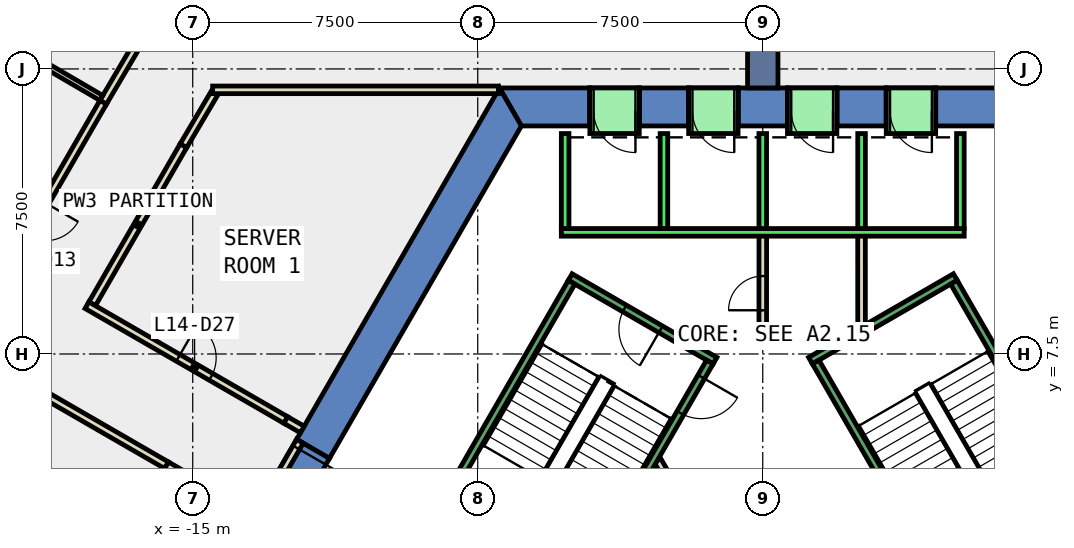
"""IFC4 building model, lengths in metres.
Left out: names, types, materials, properties, quantities, classifications, styles, units other than length and angle.
Written with IfcOpenShell. Run it as: python <this file> out.ifc"""

import sys

from ifc_helpers import new_model, si_unit, direction, frame, frame_2d, origin, place, context, subcontext, project, spatial, polyline, rectangle, outline, extrude, element, fill, save


model = new_model("IFC4")
c1 = context("Model", 3, precision=1e-05, world=origin(), true_north=direction((0.0, 1.0)))
c2 = subcontext(c1, "Body", "Model", "MODEL_VIEW")
j1 = project(units=[si_unit("LENGTHUNIT", "METRE"), si_unit("PLANEANGLEUNIT", "RADIAN")], contexts=[c1])
p1 = place(None, origin())
s1 = spatial("IfcSite", under=j1, at=p1, CompositionType="ELEMENT")
p2 = place(p1, origin())
s2 = spatial("IfcBuilding", under=s1, at=p2, CompositionType="ELEMENT")
p3 = place(p2, frame((0.0, 0.0, 68.6)))
s3 = spatial("IfcBuildingStorey", under=s2, at=p3, CompositionType="ELEMENT", Elevation=68.6)
p4 = place(p3, frame((0.0, 0.0, -0.4)))
e1 = element("IfcWall", 1, at=p4, inside=s3, PredefinedType="SHEAR", context=c2, shape_type="SweptSolid", body=[
    extrude(outline(polyline([(4.55, 14.5), (4.55, 13.5), (6.351, 13.5), (6.928, 14.5), (4.55, 14.5)])), origin(), (0.0, 0.0, 1.0), 4.2),
])
p5 = place(p3, frame((0.0, 0.0, -0.4)))
e2 = element("IfcWall", 2, at=p5, inside=s3, PredefinedType="SHEAR", context=c2, shape_type="SweptSolid", body=[
    extrude(outline(polyline([(1.95, 14.5), (1.95, 13.5), (3.25, 13.5), (3.25, 14.5), (1.95, 14.5)])), origin(), (0.0, 0.0, 1.0), 4.2),
])
p6 = place(p3, frame((0.0, 0.0, -0.4)))
e3 = element("IfcWall", 3, at=p6, inside=s3, PredefinedType="SHEAR", context=c2, shape_type="SweptSolid", body=[
    extrude(outline(polyline([(-0.65, 14.5), (-0.65, 13.5), (0.65, 13.5), (0.65, 14.5), (-0.65, 14.5)])), origin(), (0.0, 0.0, 1.0), 4.2),
])
p7 = place(p3, frame((0.0, 0.0, -0.4)))
e4 = element("IfcWall", 4, at=p7, inside=s3, PredefinedType="SHEAR", context=c2, shape_type="SweptSolid", body=[
    extrude(outline(polyline([(-3.25, 14.5), (-3.25, 13.5), (-1.95, 13.5), (-1.95, 14.5), (-3.25, 14.5)])), origin(), (0.0, 0.0, 1.0), 4.2),
])
p8 = place(p3, frame((0.0, 0.0, -0.4)))
e5 = element("IfcWall", 5, at=p8, inside=s3, PredefinedType="SHEAR", context=c2, shape_type="SweptSolid", body=[
    extrude(outline(polyline([(-4.55, 13.5), (-4.55, 14.5), (-6.928, 14.5), (-6.351, 13.5), (-4.55, 13.5)])), origin(), (0.0, 0.0, 1.0), 4.2),
])
p9 = place(p3, frame((0.0, 0.0, 3.6)))
e6 = element("IfcWall", 6, at=p9, inside=s3, PredefinedType="SHEAR", context=c2, shape_type="SweptSolid", body=[
    extrude(outline(polyline([(3.25, 14.5), (3.25, 13.5), (4.55, 13.5), (4.55, 14.5), (3.25, 14.5)])), origin(), (0.0, 0.0, 1.0), 0.2),
])
p10 = place(p3, frame((0.0, 0.0, 3.6)))
e7 = element("IfcWall", 7, at=p10, inside=s3, PredefinedType="SHEAR", context=c2, shape_type="SweptSolid", body=[
    extrude(outline(polyline([(0.65, 14.5), (0.65, 13.5), (1.95, 13.5), (1.95, 14.5), (0.65, 14.5)])), origin(), (0.0, 0.0, 1.0), 0.2),
])
p11 = place(p3, frame((0.0, 0.0, 3.6)))
e8 = element("IfcWall", 8, at=p11, inside=s3, PredefinedType="SHEAR", context=c2, shape_type="SweptSolid", body=[
    extrude(outline(polyline([(-1.95, 14.5), (-1.95, 13.5), (-0.65, 13.5), (-0.65, 14.5), (-1.95, 14.5)])), origin(), (0.0, 0.0, 1.0), 0.2),
])
p12 = place(p3, frame((0.0, 0.0, 3.6)))
e9 = element("IfcWall", 9, at=p12, inside=s3, PredefinedType="SHEAR", context=c2, shape_type="SweptSolid", body=[
    extrude(outline(polyline([(-4.55, 14.5), (-4.55, 13.5), (-3.25, 13.5), (-3.25, 14.5), (-4.55, 14.5)])), origin(), (0.0, 0.0, 1.0), 0.2),
])
p13 = place(p3, frame((0.0, 0.0, -0.4)))
e10 = element("IfcWall", 10, at=p13, inside=s3, PredefinedType="SHEAR", context=c2, shape_type="SweptSolid", body=[
    extrude(outline(polyline([(-12.267, 5.252), (-11.402, 4.752), (-6.351, 13.5), (-6.928, 14.5), (-12.267, 5.252)])), origin(), (0.0, 0.0, 1.0), 4.2),
])
p14 = place(p3, frame((0.0, 0.0, 3.6)))
e11 = element("IfcWall", 11, at=p14, inside=s3, PredefinedType="SHEAR", context=c2, shape_type="SweptSolid", body=[
    extrude(outline(polyline([(-13.267, 3.52), (-12.402, 3.02), (-11.402, 4.752), (-12.267, 5.252), (-13.267, 3.52)])), origin(), (0.0, 0.0, 1.0), 0.2),
])
p15 = place(p3, frame((0.0, 14.5, -0.4), z_axis=(0.0, 0.0, 1.0), x_axis=(0.0, 1.0, 0.0)))
e12 = element("IfcWall", 12, at=p15, inside=s3, PredefinedType="SHEAR", context=c2, shape_type="SweptSolid", body=[
    extrude(rectangle(XDim=9.0, YDim=0.8, at=frame_2d((4.5, 0.0))), origin(), (0.0, 0.0, 1.0), 4.2),
])
p16 = place(p3, frame((-14.427, 14.364, 0.0), z_axis=(0.0, 0.0, 1.0), x_axis=(-0.508509719672, -0.861056249614, 0.0)))
e13 = element("IfcWall", 13, at=p16, inside=s3, PredefinedType="PARTITIONING", context=c2, shape_type="SweptSolid", body=[
    extrude(rectangle(XDim=1.611, YDim=0.2, at=frame_2d((0.805, 0.0))), origin(), (0.0, 0.0, 1.0), 3.8),
])
p17 = place(p3, frame((-15.246, 12.977, 0.0), z_axis=(0.0, 0.0, 1.0), x_axis=(-0.499891203561, -0.866088208327, 0.0)))
e14 = element("IfcWall", 14, at=p17, inside=s3, PredefinedType="PARTITIONING", context=c2, shape_type="SweptSolid", body=[
    extrude(rectangle(XDim=4.801, YDim=0.2, at=frame_2d((2.4, 0.0))), origin(), (0.0, 0.0, 1.0), 3.8),
])
p18 = place(p3, frame((-17.783, 8.783, 0.0), z_axis=(0.0, 0.0, 1.0), x_axis=(0.866041598752, -0.499971948444, 0.0)))
e15 = element("IfcWall", 15, at=p18, inside=s3, PredefinedType="PARTITIONING", context=c2, shape_type="SweptSolid", body=[
    extrude(rectangle(XDim=6.042, YDim=0.2, at=frame_2d((3.021, 0.0))), origin(), (0.0, 0.0, 1.0), 3.8),
])
p19 = place(p18, frame((2.771, 0.0, 0.0)))
e16 = element("IfcOpeningElement", 16, at=p19, cuts=e15, PredefinedType="OPENING", context=c2, shape_type="SweptSolid", body=[
    extrude(rectangle(XDim=1.0, YDim=2.1, at=frame_2d((0.5, 1.05))), frame((0.0, 0.11, 0.0), z_axis=(0.0, -1.0, 0.0), x_axis=(1.0, 0.0, 0.0)), (0.0, 0.0, 1.0), 0.22),
])
p20 = place(p3, frame((-15.687, 4.571, 0.0), z_axis=(0.0, 0.0, 1.0), x_axis=(-0.866044530317, 0.49996687041, 0.0)))
e17 = element("IfcWall", 17, at=p20, inside=s3, PredefinedType="PARTITIONING", context=c2, shape_type="SweptSolid", body=[
    extrude(rectangle(XDim=3.718, YDim=0.2, at=frame_2d((1.859, 0.0))), origin(), (0.0, 0.0, 1.0), 3.8),
])
p21 = place(p3, frame((-17.357, 14.122, 0.0), z_axis=(0.0, 0.0, 1.0), x_axis=(0.508298575594, 0.861180909014, 0.0)))
e18 = element("IfcWall", 18, at=p21, inside=s3, PredefinedType="PARTITIONING", context=c2, shape_type="SweptSolid", body=[
    extrude(rectangle(XDim=7.258, YDim=0.2, at=frame_2d((3.629, 0.0))), origin(), (0.0, 0.0, 1.0), 3.8),
])
p22 = place(p21, frame((3.204, 0.0, 0.0)))
e19 = element("IfcOpeningElement", 19, at=p22, cuts=e18, PredefinedType="OPENING", context=c2, shape_type="SweptSolid", body=[
    extrude(rectangle(XDim=1.0, YDim=2.1, at=frame_2d((0.5, 1.05))), frame((0.0, 0.11, 0.0), z_axis=(0.0, -1.0, 0.0), x_axis=(1.0, 0.0, 0.0)), (0.0, 0.0, 1.0), 0.22),
])
p23 = place(p3, frame((-17.356, 14.122, 0.0), z_axis=(0.0, 0.0, 1.0), x_axis=(-0.499946764175, -0.866056137321, 0.0)))
e20 = element("IfcWall", 20, at=p23, inside=s3, PredefinedType="PARTITIONING", context=c2, shape_type="SweptSolid", body=[
    extrude(rectangle(XDim=7.255, YDim=0.2, at=frame_2d((3.627, 0.0))), origin(), (0.0, 0.0, 1.0), 3.8),
])
p24 = place(p23, frame((3.052, 0.0, 0.0)))
e21 = element("IfcOpeningElement", 21, at=p24, cuts=e20, PredefinedType="OPENING", context=c2, shape_type="SweptSolid", body=[
    extrude(rectangle(XDim=1.0, YDim=2.1, at=frame_2d((0.5, 1.05))), frame((0.0, 0.11, 0.0), z_axis=(0.0, -1.0, 0.0), x_axis=(1.0, 0.0, 0.0)), (0.0, 0.0, 1.0), 0.22),
])
p25 = place(p3, frame((1.88, 7.8, 0.0), z_axis=(0.0, 0.0, 1.0), x_axis=(-1.0, 0.0, 0.0)))
e22 = element("IfcWall", 22, at=p25, inside=s3, PredefinedType="PARTITIONING", context=c2, shape_type="SweptSolid", body=[
    extrude(rectangle(XDim=1.78, YDim=0.2, at=frame_2d((0.89, 0.0))), origin(), (0.0, 0.0, 1.0), 3.8),
])
p26 = place(p3, frame((0.0, 7.7, 0.0), z_axis=(0.0, 0.0, 1.0), x_axis=(0.000325520816, 0.999999947018, 0.0)))
e23 = element("IfcWall", 23, at=p26, inside=s3, PredefinedType="PARTITIONING", context=c2, shape_type="SweptSolid", body=[
    extrude(rectangle(XDim=3.0, YDim=0.2, at=frame_2d((1.5, 0.0))), origin(), (0.0, 0.0, 1.0), 3.8),
])
p27 = place(p26, frame((0.95, 0.0, 0.0)))
e24 = element("IfcOpeningElement", 24, at=p27, cuts=e23, PredefinedType="OPENING", context=c2, shape_type="SweptSolid", body=[
    extrude(rectangle(XDim=0.9, YDim=2.1, at=frame_2d((0.45, 1.05))), frame((0.0, 0.11, 0.0), z_axis=(0.0, -1.0, 0.0), x_axis=(1.0, 0.0, 0.0)), (0.0, 0.0, 1.0), 0.22),
])
p28 = place(p3, frame((2.599, 10.7, 0.0), z_axis=(0.0, 0.0, 1.0), x_axis=(0.000393159002, -0.999999922713, 0.0)))
e25 = element("IfcWall", 25, at=p28, inside=s3, PredefinedType="PARTITIONING", context=c2, shape_type="SweptSolid", body=[
    extrude(rectangle(XDim=2.484, YDim=0.2, at=frame_2d((1.242, 0.0))), origin(), (0.0, 0.0, 1.0), 3.8),
])
p29 = place(p3, frame((-6.957, 14.45, 0.0), z_axis=(0.0, 0.0, 1.0), x_axis=(-1.0, 0.0, 0.0)))
e26 = element("IfcWall", 26, at=p29, inside=s3, PredefinedType="PARTITIONING", context=c2, shape_type="SweptSolid", body=[
    extrude(rectangle(XDim=7.519, YDim=0.2, at=frame_2d((3.76, 0.0))), origin(), (0.0, 0.0, 1.0), 3.8),
])
p30 = place(p3, frame((-2.771, 4.7, 0.0), z_axis=(0.0, 0.0, 1.0), x_axis=(0.499969479948, -0.866043023828, 0.0)))
e27 = element("IfcWall", 27, at=p30, inside=s3, PredefinedType="PARTITIONING", context=c2, shape_type="SweptSolid", body=[
    extrude(rectangle(XDim=4.99, YDim=0.2, at=frame_2d((2.495, 0.0))), origin(), (0.0, 0.0, 1.0), 3.8),
])
p31 = place(p30, frame((1.945, 0.0, 0.0)))
e28 = element("IfcOpeningElement", 28, at=p31, cuts=e27, PredefinedType="OPENING", context=c2, shape_type="SweptSolid", body=[
    extrude(rectangle(XDim=1.0, YDim=2.1, at=frame_2d((0.5, 1.05))), frame((0.0, 0.11, 0.0), z_axis=(0.0, -1.0, 0.0), x_axis=(1.0, 0.0, 0.0)), (0.0, 0.0, 1.0), 0.22),
])
p32 = place(p3, frame((-15.724, 4.534, 0.0), z_axis=(0.0, 0.0, 1.0), x_axis=(0.500195085719, -0.865912741691, 0.0)))
e29 = element("IfcWall", 29, at=p32, inside=s3, PredefinedType="PARTITIONING", context=c2, shape_type="SweptSolid", body=[
    extrude(rectangle(XDim=1.282, YDim=0.2, at=frame_2d((0.641, 0.0))), origin(), (0.0, 0.0, 1.0), 3.8),
])
p33 = place(p3, frame((-17.405, 14.237, 0.0), z_axis=(0.0, 0.0, 1.0), x_axis=(-0.863614048932, 0.504153522736, 0.0)))
e30 = element("IfcWall", 30, at=p33, inside=s3, PredefinedType="PARTITIONING", context=c2, shape_type="SweptSolid", body=[
    extrude(rectangle(XDim=5.48, YDim=0.15, at=frame_2d((2.74, 0.0))), origin(), (0.0, 0.0, 1.0), 3.8),
])
p34 = place(p3, frame((-12.18, 5.202, 0.0), z_axis=(0.0, 0.0, 1.0), x_axis=(-0.50002537861, -0.866010750942, 0.0)))
e31 = element("IfcWall", 31, at=p34, inside=s3, PredefinedType="PARTITIONING", context=c2, shape_type="SweptSolid", body=[
    extrude(rectangle(XDim=2.0, YDim=0.2, at=frame_2d((1.0, 0.0))), origin(), (0.0, 0.0, 1.0), 2.4),
])
p35 = place(p34, frame((0.19, 0.0, 0.0)))
e32 = element("IfcOpeningElement", 32, at=p35, cuts=e31, PredefinedType="OPENING", context=c2, shape_type="SweptSolid", body=[
    extrude(rectangle(XDim=1.8, YDim=2.1, at=frame_2d((0.9, 1.05))), frame((0.0, 0.11, 0.0), z_axis=(0.0, -1.0, 0.0), x_axis=(1.0, 0.0, 0.0)), (0.0, 0.0, 1.0), 0.22),
])
p36 = place(p3, frame((-12.55, 5.762, 0.0), z_axis=(0.0, 0.0, 1.0), x_axis=(0.866071776036, -0.499919672301, 0.0)))
e33 = element("IfcWall", 33, at=p36, inside=s3, PredefinedType="PARTITIONING", context=c2, shape_type="SweptSolid", body=[
    extrude(rectangle(XDim=0.5, YDim=0.2, at=frame_2d((0.25, 0.0))), origin(), (0.0, 0.0, 1.0), 2.4),
])
p37 = place(p3, frame((-13.85, 3.51, 0.0), z_axis=(0.0, 0.0, 1.0), x_axis=(-0.865924890849, 0.500174053114, 0.0)))
e34 = element("IfcWall", 34, at=p37, inside=s3, PredefinedType="PARTITIONING", context=c2, shape_type="SweptSolid", body=[
    extrude(rectangle(XDim=2.121, YDim=0.2, at=frame_2d((1.061, 0.0))), origin(), (0.0, 0.0, 1.0), 3.8),
])
p38 = place(p3, frame((5.3, 10.7, 0.0), z_axis=(0.0, 0.0, 1.0), x_axis=(-1.0, 0.0, 0.0)))
e35 = element("IfcWall", 35, at=p38, inside=s3, PredefinedType="STANDARD", context=c2, shape_type="SweptSolid", body=[
    extrude(rectangle(XDim=10.6, YDim=0.2, at=frame_2d((5.3, 0.0))), origin(), (0.0, 0.0, 1.0), 3.8),
])
for number, where, z_axis, x_axis in (
    (36, (5.2, 10.8, 0.0), (0.0, 0.0, 1.0), (0.0, 1.0, 0.0)),
    (37, (2.6, 10.8, 0.0), (0.0, 0.0, 1.0), (0.0, 1.0, 0.0)),
    (38, (0.0, 10.8, 0.0), (0.0, 0.0, 1.0), (0.0, 1.0, 0.0)),
    (39, (-2.6, 10.8, 0.0), (0.0, 0.0, 1.0), (0.0, 1.0, 0.0)),
    (40, (-5.2, 10.8, 0.0), (0.0, 0.0, 1.0), (0.0, 1.0, 0.0)),
):
    element("IfcWall", number, at=place(p3, frame(where, z_axis=z_axis, x_axis=x_axis)), inside=s3, PredefinedType="STANDARD", context=c2, shape_type="SweptSolid", body=[
        extrude(rectangle(XDim=2.5, YDim=0.2, at=frame_2d((1.25, 0.0))), origin(), (0.0, 0.0, 1.0), 3.8),
    ])
p39 = place(p3, frame((4.55, 13.9, 0.0), z_axis=(0.0, 0.0, 1.0), x_axis=(-1.0, 0.0, 0.0)))
e41 = element("IfcWall", 41, at=p39, inside=s3, PredefinedType="STANDARD", context=c2, shape_type="SweptSolid", body=[
    extrude(rectangle(XDim=1.3, YDim=1.2, at=frame_2d((0.65, 0.0))), origin(), (0.0, 0.0, 1.0), 2.4),
])
p40 = place(p39, frame((0.1, 0.0, 0.0)))
e42 = element("IfcOpeningElement", 42, at=p40, cuts=e41, PredefinedType="OPENING", context=c2, shape_type="SweptSolid", body=[
    extrude(rectangle(XDim=1.1, YDim=2.3, at=frame_2d((0.55, 1.15))), frame((0.0, 0.61, 0.0), z_axis=(0.0, -1.0, 0.0), x_axis=(1.0, 0.0, 0.0)), (0.0, 0.0, 1.0), 1.22),
])
p41 = place(p3, frame((1.95, 13.9, 0.0), z_axis=(0.0, 0.0, 1.0), x_axis=(-1.0, 0.0, 0.0)))
e43 = element("IfcWall", 43, at=p41, inside=s3, PredefinedType="STANDARD", context=c2, shape_type="SweptSolid", body=[
    extrude(rectangle(XDim=1.3, YDim=1.2, at=frame_2d((0.65, 0.0))), origin(), (0.0, 0.0, 1.0), 2.4),
])
p42 = place(p41, frame((0.1, 0.0, 0.0)))
e44 = element("IfcOpeningElement", 44, at=p42, cuts=e43, PredefinedType="OPENING", context=c2, shape_type="SweptSolid", body=[
    extrude(rectangle(XDim=1.1, YDim=2.3, at=frame_2d((0.55, 1.15))), frame((0.0, 0.61, 0.0), z_axis=(0.0, -1.0, 0.0), x_axis=(1.0, 0.0, 0.0)), (0.0, 0.0, 1.0), 1.22),
])
p43 = place(p3, frame((-0.65, 13.9, 0.0), z_axis=(0.0, 0.0, 1.0), x_axis=(-1.0, 0.0, 0.0)))
e45 = element("IfcWall", 45, at=p43, inside=s3, PredefinedType="STANDARD", context=c2, shape_type="SweptSolid", body=[
    extrude(rectangle(XDim=1.3, YDim=1.2, at=frame_2d((0.65, 0.0))), origin(), (0.0, 0.0, 1.0), 2.4),
])
p44 = place(p43, frame((0.1, 0.0, 0.0)))
e46 = element("IfcOpeningElement", 46, at=p44, cuts=e45, PredefinedType="OPENING", context=c2, shape_type="SweptSolid", body=[
    extrude(rectangle(XDim=1.1, YDim=2.3, at=frame_2d((0.55, 1.15))), frame((0.0, 0.61, 0.0), z_axis=(0.0, -1.0, 0.0), x_axis=(1.0, 0.0, 0.0)), (0.0, 0.0, 1.0), 1.22),
])
p45 = place(p3, frame((-3.25, 13.9, 0.0), z_axis=(0.0, 0.0, 1.0), x_axis=(-1.0, 0.0, 0.0)))
e47 = element("IfcWall", 47, at=p45, inside=s3, PredefinedType="STANDARD", context=c2, shape_type="SweptSolid", body=[
    extrude(rectangle(XDim=1.3, YDim=1.2, at=frame_2d((0.65, 0.0))), origin(), (0.0, 0.0, 1.0), 2.4),
])
p46 = place(p45, frame((0.1, 0.0, 0.0)))
e48 = element("IfcOpeningElement", 48, at=p46, cuts=e47, PredefinedType="OPENING", context=c2, shape_type="SweptSolid", body=[
    extrude(rectangle(XDim=1.1, YDim=2.3, at=frame_2d((0.55, 1.15))), frame((0.0, 0.61, 0.0), z_axis=(0.0, -1.0, 0.0), x_axis=(1.0, 0.0, 0.0)), (0.0, 0.0, 1.0), 1.22),
])
p47 = place(p3, frame((1.256, 7.324, 0.0), z_axis=(0.0, 0.0, 1.0), x_axis=(0.866046073146, 0.499964197906, 0.0)))
e49 = element("IfcWall", 49, at=p47, inside=s3, PredefinedType="STANDARD", context=c2, shape_type="SweptSolid", body=[
    extrude(rectangle(XDim=4.4, YDim=0.2, at=frame_2d((2.2, 0.0))), origin(), (0.0, 0.0, 1.0), 3.8),
])
p48 = place(p3, frame((4.843, 1.312, 0.0), z_axis=(0.0, 0.0, 1.0), x_axis=(-0.499963383562, 0.866046543262, 0.0)))
e50 = element("IfcWall", 50, at=p48, inside=s3, PredefinedType="STANDARD", context=c2, shape_type="SweptSolid", body=[
    extrude(rectangle(XDim=6.9, YDim=0.2, at=frame_2d((3.45, 0.0))), origin(), (0.0, 0.0, 1.0), 3.8),
])
p49 = place(p48, frame((0.45, 0.0, 0.0)))
e51 = element("IfcOpeningElement", 51, at=p49, cuts=e50, PredefinedType="OPENING", context=c2, shape_type="SweptSolid", body=[
    extrude(rectangle(XDim=1.1, YDim=2.2, at=frame_2d((0.55, 1.1))), frame((0.0, 0.11, 0.0), z_axis=(0.0, -1.0, 0.0), x_axis=(1.0, 0.0, 0.0)), (0.0, 0.0, 1.0), 0.22),
])
p50 = place(p3, frame((8.48, 3.412, 0.0), z_axis=(0.0, 0.0, 1.0), x_axis=(-0.499978703459, 0.866037698999, 0.0)))
e52 = element("IfcWall", 52, at=p50, inside=s3, PredefinedType="STANDARD", context=c2, shape_type="SweptSolid", body=[
    extrude(rectangle(XDim=6.9, YDim=0.2, at=frame_2d((3.45, 0.0))), origin(), (0.0, 0.0, 1.0), 3.8),
])
p51 = place(p3, frame((-1.256, 7.324, 0.0), z_axis=(0.0, 0.0, 1.0), x_axis=(-0.866046073146, 0.499964197906, 0.0)))
e53 = element("IfcWall", 53, at=p51, inside=s3, PredefinedType="STANDARD", context=c2, shape_type="SweptSolid", body=[
    extrude(rectangle(XDim=4.4, YDim=0.2, at=frame_2d((2.2, 0.0))), origin(), (0.0, 0.0, 1.0), 3.8),
])
p52 = place(p51, frame((1.65, 0.0, 0.0)))
e54 = element("IfcOpeningElement", 54, at=p52, cuts=e53, PredefinedType="OPENING", context=c2, shape_type="SweptSolid", body=[
    extrude(rectangle(XDim=1.1, YDim=2.2, at=frame_2d((0.55, 1.1))), frame((0.0, 0.11, 0.0), z_axis=(0.0, -1.0, 0.0), x_axis=(1.0, 0.0, 0.0)), (0.0, 0.0, 1.0), 0.22),
])
p53 = place(p3, frame((-1.393, 7.288, 0.0), z_axis=(0.0, 0.0, 1.0), x_axis=(-0.499963383562, -0.866046543262, 0.0)))
e55 = element("IfcWall", 55, at=p53, inside=s3, PredefinedType="STANDARD", context=c2, shape_type="SweptSolid", body=[
    extrude(rectangle(XDim=6.9, YDim=0.2, at=frame_2d((3.45, 0.0))), origin(), (0.0, 0.0, 1.0), 3.8),
])
p54 = place(p53, frame((0.45, 0.0, 0.0)))
e56 = element("IfcOpeningElement", 56, at=p54, cuts=e55, PredefinedType="OPENING", context=c2, shape_type="SweptSolid", body=[
    extrude(rectangle(XDim=1.1, YDim=2.2, at=frame_2d((0.55, 1.1))), frame((0.0, 0.11, 0.0), z_axis=(0.0, -1.0, 0.0), x_axis=(1.0, 0.0, 0.0)), (0.0, 0.0, 1.0), 0.22),
])
p55 = place(p3, frame((-5.03, 9.388, 0.0), z_axis=(0.0, 0.0, 1.0), x_axis=(-0.499978703459, -0.866037698999, 0.0)))
e57 = element("IfcWall", 57, at=p55, inside=s3, PredefinedType="STANDARD", context=c2, shape_type="SweptSolid", body=[
    extrude(rectangle(XDim=6.9, YDim=0.2, at=frame_2d((3.45, 0.0))), origin(), (0.0, 0.0, 1.0), 3.8),
])
p56 = place(p19, origin())
e58 = element("IfcDoor", 58, at=p56, inside=s3, OperationType="SINGLE_SWING_LEFT", PredefinedType="DOOR", context=c2, shape_type="SweptSolid", body=[
    extrude(rectangle(XDim=1.0, YDim=2.1, at=frame_2d((0.5, 1.05))), frame((0.0, 0.025, 0.0), z_axis=(0.0, -1.0, 0.0), x_axis=(1.0, 0.0, 0.0)), (0.0, 0.0, 1.0), 0.05),
])
fill(e16, e58)
p57 = place(p27, origin())
e59 = element("IfcDoor", 59, at=p57, inside=s3, OperationType="SINGLE_SWING_RIGHT", PredefinedType="DOOR", context=c2, shape_type="SweptSolid", body=[
    extrude(rectangle(XDim=0.9, YDim=2.1, at=frame_2d((0.45, 1.05))), frame((0.0, 0.025, 0.0), z_axis=(0.0, -1.0, 0.0), x_axis=(1.0, 0.0, 0.0)), (0.0, 0.0, 1.0), 0.05),
])
fill(e24, e59)
p58 = place(p35, origin())
e60 = element("IfcDoor", 60, at=p58, inside=s3, OperationType="DOUBLE_DOOR_SINGLE_SWING", PredefinedType="DOOR", context=c2, shape_type="SweptSolid", body=[
    extrude(rectangle(XDim=1.8, YDim=2.1, at=frame_2d((0.9, 1.05))), frame((0.0, 0.025, 0.0), z_axis=(0.0, -1.0, 0.0), x_axis=(1.0, 0.0, 0.0)), (0.0, 0.0, 1.0), 0.05),
])
fill(e32, e60)
p59 = place(p40, origin())
e61 = element("IfcDoor", 61, at=p59, inside=s3, OperationType="SLIDING_TO_LEFT", PredefinedType="DOOR", context=c2, shape_type="SweptSolid", body=[
    extrude(rectangle(XDim=1.1, YDim=2.3, at=frame_2d((0.55, 1.15))), frame((0.0, 0.025, 0.0), z_axis=(0.0, -1.0, 0.0), x_axis=(1.0, 0.0, 0.0)), (0.0, 0.0, 1.0), 0.05),
])
fill(e42, e61)
p60 = place(p42, origin())
e62 = element("IfcDoor", 62, at=p60, inside=s3, OperationType="SLIDING_TO_LEFT", PredefinedType="DOOR", context=c2, shape_type="SweptSolid", body=[
    extrude(rectangle(XDim=1.1, YDim=2.3, at=frame_2d((0.55, 1.15))), frame((0.0, 0.025, 0.0), z_axis=(0.0, -1.0, 0.0), x_axis=(1.0, 0.0, 0.0)), (0.0, 0.0, 1.0), 0.05),
])
fill(e44, e62)
p61 = place(p44, origin())
e63 = element("IfcDoor", 63, at=p61, inside=s3, OperationType="SLIDING_TO_LEFT", PredefinedType="DOOR", context=c2, shape_type="SweptSolid", body=[
    extrude(rectangle(XDim=1.1, YDim=2.3, at=frame_2d((0.55, 1.15))), frame((0.0, 0.025, 0.0), z_axis=(0.0, -1.0, 0.0), x_axis=(1.0, 0.0, 0.0)), (0.0, 0.0, 1.0), 0.05),
])
fill(e46, e63)
p62 = place(p46, origin())
e64 = element("IfcDoor", 64, at=p62, inside=s3, OperationType="SLIDING_TO_LEFT", PredefinedType="DOOR", context=c2, shape_type="SweptSolid", body=[
    extrude(rectangle(XDim=1.1, YDim=2.3, at=frame_2d((0.55, 1.15))), frame((0.0, 0.025, 0.0), z_axis=(0.0, -1.0, 0.0), x_axis=(1.0, 0.0, 0.0)), (0.0, 0.0, 1.0), 0.05),
])
fill(e48, e64)
p63 = place(p54, origin())
e65 = element("IfcDoor", 65, at=p63, inside=s3, OperationType="SINGLE_SWING_LEFT", PredefinedType="DOOR", context=c2, shape_type="SweptSolid", body=[
    extrude(rectangle(XDim=1.1, YDim=2.2, at=frame_2d((0.55, 1.1))), frame((0.0, 0.025, 0.0), z_axis=(0.0, -1.0, 0.0), x_axis=(1.0, 0.0, 0.0)), (0.0, 0.0, 1.0), 0.05),
])
fill(e56, e65)
p64 = place(p52, origin())
e66 = element("IfcDoor", 66, at=p64, inside=s3, OperationType="SINGLE_SWING_LEFT", PredefinedType="DOOR", context=c2, shape_type="SweptSolid", body=[
    extrude(rectangle(XDim=1.1, YDim=2.2, at=frame_2d((0.55, 1.1))), frame((0.0, 0.025, 0.0), z_axis=(0.0, -1.0, 0.0), x_axis=(1.0, 0.0, 0.0)), (0.0, 0.0, 1.0), 0.05),
])
fill(e54, e66)
save(model, sys.argv[1])
